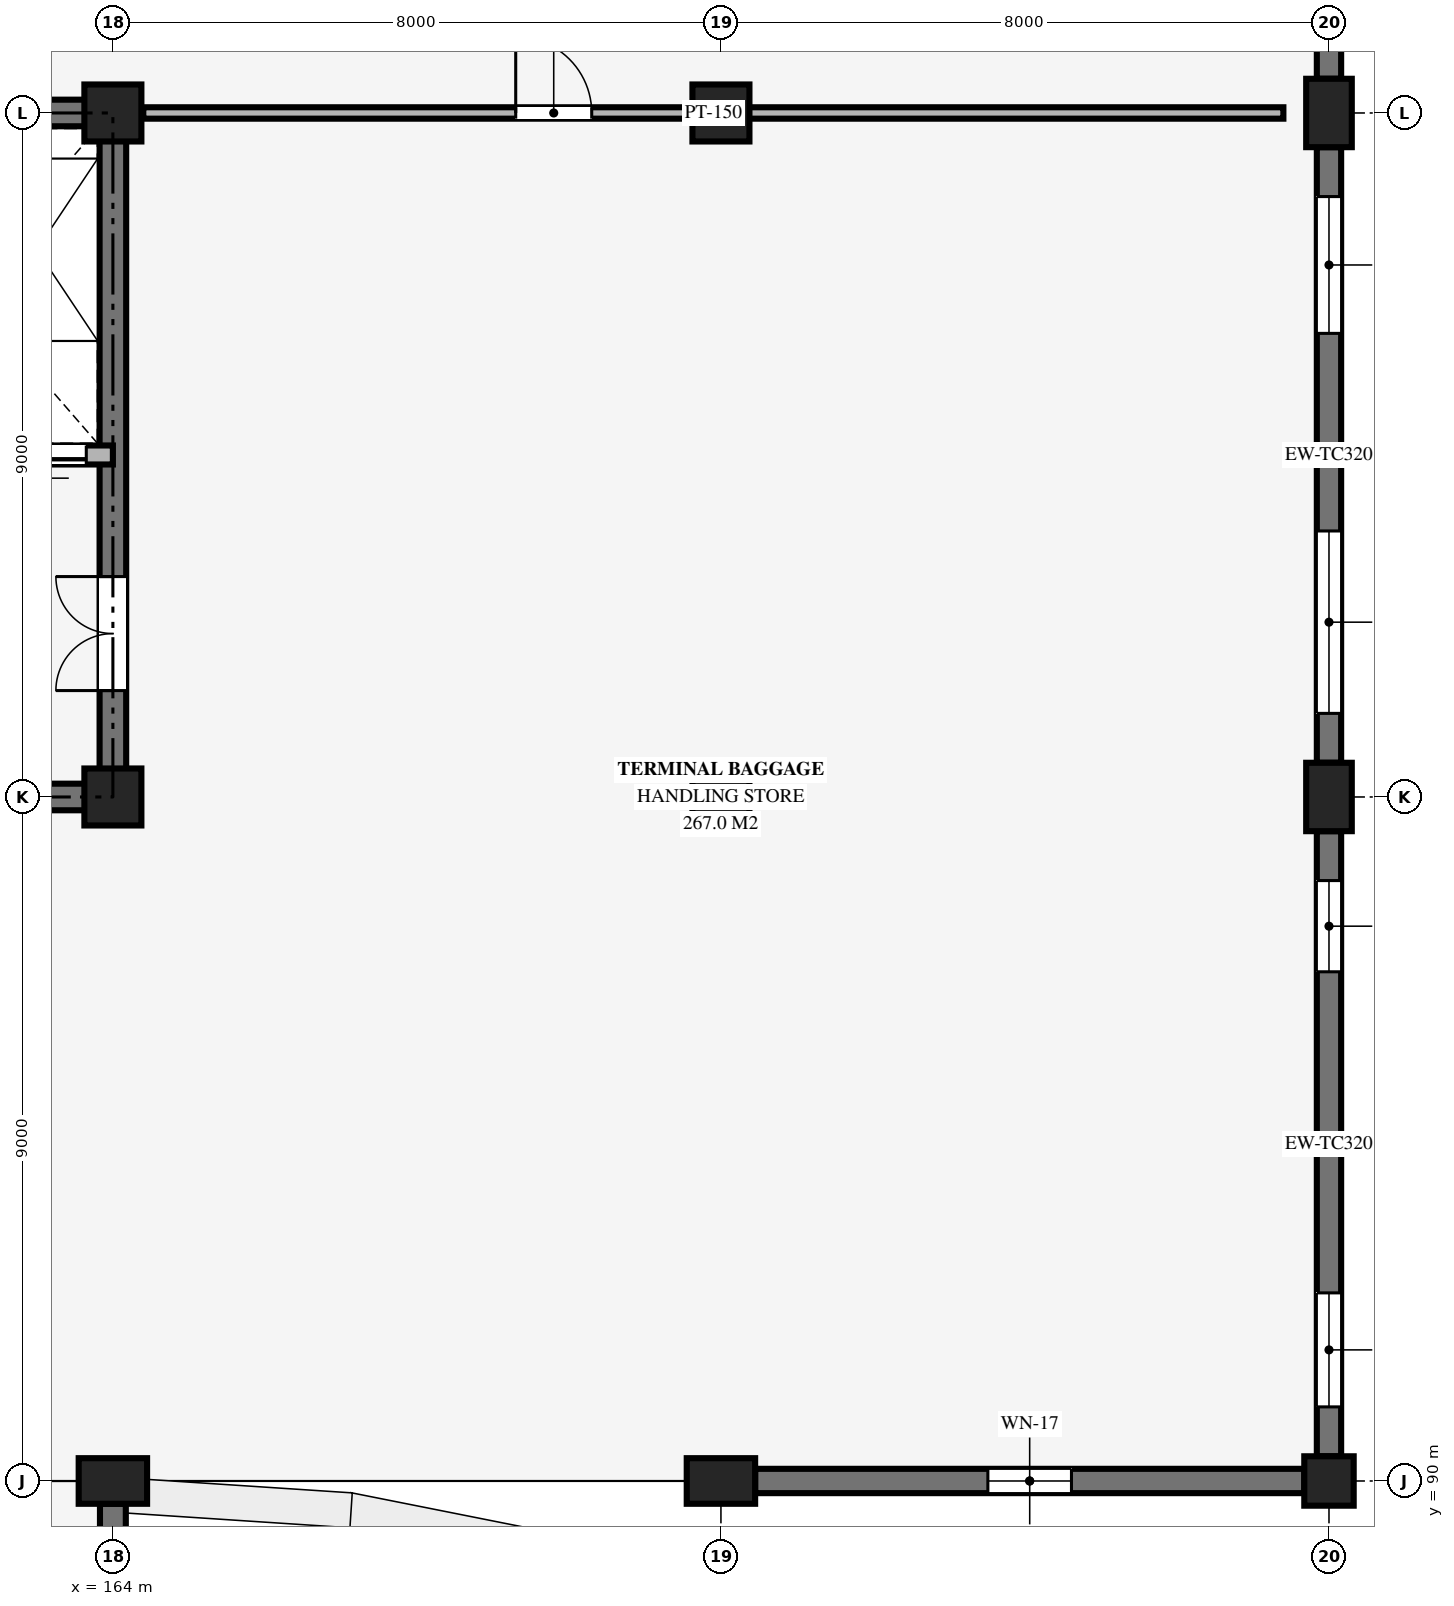
"""IFC4 building model, lengths in metres.
Left out: names, types, materials, properties, quantities, classifications, styles, units other than length and angle.
Written with IfcOpenShell. Run it as: python <this file> out.ifc"""

import sys

from ifc_helpers import new_model, si_unit, direction, frame, frame_2d, origin, origin_2d, place, context, subcontext, project, spatial, rectangle, extrude, element, fill, save


model = new_model("IFC4")
c1 = context("Model", 3, precision=1e-05, world=origin(), true_north=direction((0.0, 1.0)))
c2 = subcontext(c1, "Body", "Model", "MODEL_VIEW")
j1 = project(units=[si_unit("LENGTHUNIT", "METRE"), si_unit("PLANEANGLEUNIT", "RADIAN")], contexts=[c1])
p1 = place(None, origin())
s1 = spatial("IfcSite", under=j1, at=p1, CompositionType="ELEMENT")
p2 = place(p1, origin())
s2 = spatial("IfcBuilding", under=s1, at=p2, CompositionType="ELEMENT")
p3 = place(p2, frame((0.0, 0.0, 5.4)))
s3 = spatial("IfcBuildingStorey", under=s2, at=p3, CompositionType="ELEMENT", Elevation=5.4)
p4 = place(p3, frame((164.0, 90.0, 0.0), z_axis=(0.0, 0.0, 1.0), x_axis=(0.0, 1.0, 0.0)))
e1 = element("IfcColumn", 1, at=p4, inside=s3, PredefinedType="PILASTER", context=c2, shape_type="SweptSolid", body=[
    extrude(rectangle(XDim=0.6, YDim=0.9, at=origin_2d()), origin(), (0.0, 0.0, 1.0), 4.64),
])
for number, where, z_axis, x_axis in (
    (2, (164.0, 99.0, 0.0), (0.0, 0.0, 1.0), (1.0, 0.0, 0.0)),
    (3, (164.0, 108.0, 0.0), (0.0, 0.0, 1.0), (1.0, 0.0, 0.0)),
):
    element("IfcColumn", number, at=place(p3, frame(where, z_axis=z_axis, x_axis=x_axis)), inside=s3, PredefinedType="COLUMN", context=c2, shape_type="SweptSolid", body=[
        extrude(rectangle(XDim=0.75, YDim=0.75, at=origin_2d()), origin(), (0.0, 0.0, 1.0), 4.64),
    ])
p5 = place(p3, frame((172.0, 90.0, 0.0), z_axis=(0.0, 0.0, 1.0), x_axis=(0.0, 1.0, 0.0)))
e4 = element("IfcColumn", 4, at=p5, inside=s3, PredefinedType="PILASTER", context=c2, shape_type="SweptSolid", body=[
    extrude(rectangle(XDim=0.6, YDim=0.9, at=origin_2d()), origin(), (0.0, 0.0, 1.0), 4.64),
])
for number, where, z_axis, x_axis in (
    (5, (172.0, 99.0, 0.0), (0.0, 0.0, 1.0), (1.0, 0.0, 0.0)),
    (6, (172.0, 108.0, 0.0), (0.0, 0.0, 1.0), (1.0, 0.0, 0.0)),
):
    element("IfcColumn", number, at=place(p3, frame(where, z_axis=z_axis, x_axis=x_axis)), inside=s3, PredefinedType="COLUMN", context=c2, shape_type="SweptSolid", body=[
        extrude(rectangle(XDim=0.75, YDim=0.75, at=origin_2d()), origin(), (0.0, 0.0, 1.0), 4.64),
    ])
p6 = place(p3, frame((180.0, 90.0, 0.0), z_axis=(0.0, 0.0, 1.0), x_axis=(1.0, 0.0, 0.0)))
e7 = element("IfcColumn", 7, at=p6, inside=s3, PredefinedType="COLUMN", context=c2, shape_type="SweptSolid", body=[
    extrude(rectangle(XDim=0.65, YDim=0.65, at=origin_2d()), origin(), (0.0, 0.0, 1.0), 4.64),
])
for number, where, z_axis, x_axis in (
    (8, (180.0, 99.0, 0.0), (0.0, 0.0, 1.0), (1.0, 0.0, 0.0)),
    (9, (180.0, 108.0, 0.0), (0.0, 0.0, 1.0), (1.0, 0.0, 0.0)),
):
    element("IfcColumn", number, at=place(p3, frame(where, z_axis=z_axis, x_axis=x_axis)), inside=s3, PredefinedType="PILASTER", context=c2, shape_type="SweptSolid", body=[
        extrude(rectangle(XDim=0.6, YDim=0.9, at=origin_2d()), origin(), (0.0, 0.0, 1.0), 4.64),
    ])
p7 = place(p3, frame((164.0, 88.65, 0.0), z_axis=(0.0, 0.0, 1.0), x_axis=(0.0, 1.0, 0.0)))
e10 = element("IfcWall", 10, at=p7, inside=s3, PredefinedType="SOLIDWALL", context=c2, shape_type="SweptSolid", body=[
    extrude(rectangle(XDim=1.05, YDim=0.34, at=frame_2d((0.525, 0.0))), origin(), (0.0, 0.0, 1.0), 4.52),
])
p8 = place(p3, frame((180.0, 90.325, 0.0), z_axis=(0.0, 0.0, 1.0), x_axis=(0.0, 1.0, 0.0)))
e11 = element("IfcWall", 11, at=p8, inside=s3, PredefinedType="SOLIDWALL", context=c2, shape_type="SweptSolid", body=[
    extrude(rectangle(XDim=8.225, YDim=0.32, at=frame_2d((4.113, 0.0))), origin(), (0.0, 0.0, 1.0), 4.52),
])
p9 = place(p8, frame((0.65, 0.0, 0.95)))
e12 = element("IfcOpeningElement", 12, at=p9, cuts=e11, PredefinedType="OPENING", context=c2, shape_type="SweptSolid", body=[
    extrude(rectangle(XDim=1.5, YDim=1.8, at=frame_2d((0.75, 0.9))), frame((0.0, 0.17, 0.0), z_axis=(0.0, -1.0, 0.0), x_axis=(1.0, 0.0, 0.0)), (0.0, 0.0, 1.0), 0.34),
])
p10 = place(p8, frame((6.375, 0.0, 0.95)))
e13 = element("IfcOpeningElement", 13, at=p10, cuts=e11, PredefinedType="OPENING", context=c2, shape_type="SweptSolid", body=[
    extrude(rectangle(XDim=1.2, YDim=1.8, at=frame_2d((0.6, 0.9))), frame((0.0, 0.17, 0.0), z_axis=(0.0, -1.0, 0.0), x_axis=(1.0, 0.0, 0.0)), (0.0, 0.0, 1.0), 0.34),
])
p11 = place(p3, frame((180.0, 99.45, 0.0), z_axis=(0.0, 0.0, 1.0), x_axis=(0.0, 1.0, 0.0)))
e14 = element("IfcWall", 14, at=p11, inside=s3, PredefinedType="SOLIDWALL", context=c2, shape_type="SweptSolid", body=[
    extrude(rectangle(XDim=8.1, YDim=0.32, at=frame_2d((4.05, 0.0))), origin(), (0.0, 0.0, 1.0), 4.52),
])
p12 = place(p11, frame((0.65, 0.0, 0.95)))
e15 = element("IfcOpeningElement", 15, at=p12, cuts=e14, PredefinedType="OPENING", context=c2, shape_type="SweptSolid", body=[
    extrude(rectangle(XDim=2.4, YDim=1.5, at=frame_2d((1.2, 0.75))), frame((0.0, 0.17, 0.0), z_axis=(0.0, -1.0, 0.0), x_axis=(1.0, 0.0, 0.0)), (0.0, 0.0, 1.0), 0.34),
])
p13 = place(p11, frame((5.65, 0.0, 0.95)))
e16 = element("IfcOpeningElement", 16, at=p13, cuts=e14, PredefinedType="OPENING", context=c2, shape_type="SweptSolid", body=[
    extrude(rectangle(XDim=1.8, YDim=1.5, at=frame_2d((0.9, 0.75))), frame((0.0, 0.17, 0.0), z_axis=(0.0, -1.0, 0.0), x_axis=(1.0, 0.0, 0.0)), (0.0, 0.0, 1.0), 0.34),
])
p14 = place(p3, frame((180.0, 108.45, 0.0), z_axis=(0.0, 0.0, 1.0), x_axis=(0.0, 1.0, 0.0)))
e17 = element("IfcWall", 17, at=p14, inside=s3, PredefinedType="SOLIDWALL", context=c2, shape_type="SweptSolid", body=[
    extrude(rectangle(XDim=8.1, YDim=0.32, at=frame_2d((4.05, 0.0))), origin(), (0.0, 0.0, 1.0), 4.52),
])
p15 = place(p14, frame((0.65, 0.0, 0.95)))
e18 = element("IfcOpeningElement", 18, at=p15, cuts=e17, PredefinedType="OPENING", context=c2, shape_type="SweptSolid", body=[
    extrude(rectangle(XDim=1.5, YDim=1.5, at=frame_2d((0.75, 0.75))), frame((0.0, 0.17, 0.0), z_axis=(0.0, -1.0, 0.0), x_axis=(1.0, 0.0, 0.0)), (0.0, 0.0, 1.0), 0.34),
])
p16 = place(p14, frame((6.25, 0.0, 0.95)))
e19 = element("IfcOpeningElement", 19, at=p16, cuts=e17, PredefinedType="OPENING", context=c2, shape_type="SweptSolid", body=[
    extrude(rectangle(XDim=1.2, YDim=1.5, at=frame_2d((0.6, 0.75))), frame((0.0, 0.17, 0.0), z_axis=(0.0, -1.0, 0.0), x_axis=(1.0, 0.0, 0.0)), (0.0, 0.0, 1.0), 0.34),
])
p17 = place(p3, frame((179.675, 90.0, 0.0), z_axis=(0.0, 0.0, 1.0), x_axis=(-1.0, 0.0, 0.0)))
e20 = element("IfcWall", 20, at=p17, inside=s3, PredefinedType="SOLIDWALL", context=c2, shape_type="SweptSolid", body=[
    extrude(rectangle(XDim=7.225, YDim=0.32, at=frame_2d((3.613, 0.0))), origin(), (0.0, 0.0, 1.0), 4.52),
])
p18 = place(p17, frame((3.063, 0.0, 1.0)))
e21 = element("IfcOpeningElement", 21, at=p18, cuts=e20, PredefinedType="OPENING", context=c2, shape_type="SweptSolid", body=[
    extrude(rectangle(XDim=1.1, YDim=1.1, at=frame_2d((0.55, 0.55))), frame((0.0, 0.17, 0.0), z_axis=(0.0, -1.0, 0.0), x_axis=(1.0, 0.0, 0.0)), (0.0, 0.0, 1.0), 0.34),
])
for number, where, z_axis, x_axis in (
    (22, (156.0, 99.0, 0.0), (0.0, 0.0, 1.0), (1.0, 0.0, 0.0)),
    (23, (156.0, 108.0, 0.0), (0.0, 0.0, 1.0), (1.0, 0.0, 0.0)),
):
    element("IfcWall", number, at=place(p3, frame(where, z_axis=z_axis, x_axis=x_axis)), inside=s3, PredefinedType="SHEAR", context=c2, shape_type="SweptSolid", body=[
        extrude(rectangle(XDim=8.0, YDim=0.35, at=frame_2d((4.0, 0.0))), origin(), (0.0, 0.0, 1.0), 4.78),
    ])
p19 = place(p3, frame((164.0, 99.0, 0.0), z_axis=(0.0, 0.0, 1.0), x_axis=(0.0, 1.0, 0.0)))
e24 = element("IfcWall", 24, at=p19, inside=s3, PredefinedType="SHEAR", context=c2, shape_type="SweptSolid", body=[
    extrude(rectangle(XDim=9.0, YDim=0.35, at=frame_2d((4.5, 0.0))), origin(), (0.0, 0.0, 1.0), 4.78),
])
p20 = place(p19, frame((1.4, 0.0, 0.0)))
e25 = element("IfcOpeningElement", 25, at=p20, cuts=e24, PredefinedType="OPENING", context=c2, shape_type="SweptSolid", body=[
    extrude(rectangle(XDim=1.5, YDim=2.2, at=frame_2d((0.75, 1.1))), frame((0.0, 0.185, 0.0), z_axis=(0.0, -1.0, 0.0), x_axis=(1.0, 0.0, 0.0)), (0.0, 0.0, 1.0), 0.37),
])
p21 = place(p3, frame((164.0, 103.5, 0.0), z_axis=(0.0, 0.0, 1.0), x_axis=(-1.0, 0.0, 0.0)))
e26 = element("IfcWall", 26, at=p21, inside=s3, PredefinedType="SOLIDWALL", context=c2, shape_type="SweptSolid", body=[
    extrude(rectangle(XDim=4.0, YDim=0.25, at=frame_2d((2.0, 0.0))), origin(), (0.0, 0.0, 1.0), 3.65),
])
p22 = place(p21, frame((0.35, 0.0, 0.0)))
e27 = element("IfcOpeningElement", 27, at=p22, cuts=e26, PredefinedType="OPENING", context=c2, shape_type="SweptSolid", body=[
    extrude(rectangle(XDim=1.3, YDim=2.25, at=frame_2d((0.65, 1.125))), frame((0.0, 0.135, 0.0), z_axis=(0.0, -1.0, 0.0), x_axis=(1.0, 0.0, 0.0)), (0.0, 0.0, 1.0), 0.27),
])
p23 = place(p21, frame((2.25, 0.0, 0.0)))
e28 = element("IfcOpeningElement", 28, at=p23, cuts=e26, PredefinedType="OPENING", context=c2, shape_type="SweptSolid", body=[
    extrude(rectangle(XDim=1.2, YDim=2.2, at=frame_2d((0.6, 1.1))), frame((0.0, 0.135, 0.0), z_axis=(0.0, -1.0, 0.0), x_axis=(1.0, 0.0, 0.0)), (0.0, 0.0, 1.0), 0.27),
])
p24 = place(p3, frame((164.4, 108.0, 0.0), z_axis=(0.0, 0.0, 1.0), x_axis=(1.0, 0.0, 0.0)))
e29 = element("IfcWall", 29, at=p24, inside=s3, PredefinedType="PARTITIONING", context=c2, shape_type="SweptSolid", body=[
    extrude(rectangle(XDim=15.0, YDim=0.15, at=frame_2d((7.5, 0.0))), origin(), (0.0, 0.0, 1.0), 3.65),
])
p25 = place(p24, frame((4.9, 0.0, 0.0)))
e30 = element("IfcOpeningElement", 30, at=p25, cuts=e29, PredefinedType="OPENING", context=c2, shape_type="SweptSolid", body=[
    extrude(rectangle(XDim=1.0, YDim=2.15, at=frame_2d((0.5, 1.075))), frame((0.0, 0.085, 0.0), z_axis=(0.0, -1.0, 0.0), x_axis=(1.0, 0.0, 0.0)), (0.0, 0.0, 1.0), 0.17),
])
p26 = place(p9, origin())
e31 = element("IfcWindow", 31, at=p26, inside=s3, PartitioningType="SINGLE_PANEL", PredefinedType="WINDOW", context=c2, shape_type="SweptSolid", body=[
    extrude(rectangle(XDim=1.5, YDim=1.8, at=frame_2d((0.75, 0.9))), frame((0.0, 0.03, 0.0), z_axis=(0.0, -1.0, 0.0), x_axis=(1.0, 0.0, 0.0)), (0.0, 0.0, 1.0), 0.06),
])
fill(e12, e31)
p27 = place(p10, origin())
e32 = element("IfcWindow", 32, at=p27, inside=s3, PartitioningType="SINGLE_PANEL", PredefinedType="WINDOW", context=c2, shape_type="SweptSolid", body=[
    extrude(rectangle(XDim=1.2, YDim=1.8, at=frame_2d((0.6, 0.9))), frame((0.0, 0.03, 0.0), z_axis=(0.0, -1.0, 0.0), x_axis=(1.0, 0.0, 0.0)), (0.0, 0.0, 1.0), 0.06),
])
fill(e13, e32)
p28 = place(p12, origin())
e33 = element("IfcWindow", 33, at=p28, inside=s3, PartitioningType="SINGLE_PANEL", PredefinedType="WINDOW", context=c2, shape_type="SweptSolid", body=[
    extrude(rectangle(XDim=2.4, YDim=1.5, at=frame_2d((1.2, 0.75))), frame((0.0, 0.03, 0.0), z_axis=(0.0, -1.0, 0.0), x_axis=(1.0, 0.0, 0.0)), (0.0, 0.0, 1.0), 0.06),
])
fill(e15, e33)
p29 = place(p13, origin())
e34 = element("IfcWindow", 34, at=p29, inside=s3, PartitioningType="SINGLE_PANEL", PredefinedType="WINDOW", context=c2, shape_type="SweptSolid", body=[
    extrude(rectangle(XDim=1.8, YDim=1.5, at=frame_2d((0.9, 0.75))), frame((0.0, 0.03, 0.0), z_axis=(0.0, -1.0, 0.0), x_axis=(1.0, 0.0, 0.0)), (0.0, 0.0, 1.0), 0.06),
])
fill(e16, e34)
p30 = place(p18, origin())
e35 = element("IfcWindow", 35, at=p30, inside=s3, PartitioningType="SINGLE_PANEL", PredefinedType="WINDOW", context=c2, shape_type="SweptSolid", body=[
    extrude(rectangle(XDim=1.1, YDim=1.1, at=frame_2d((0.55, 0.55))), frame((0.0, 0.03, 0.0), z_axis=(0.0, -1.0, 0.0), x_axis=(1.0, 0.0, 0.0)), (0.0, 0.0, 1.0), 0.06),
])
fill(e21, e35)
p31 = place(p22, origin())
e36 = element("IfcDoor", 36, at=p31, inside=s3, OperationType="DOUBLE_DOOR_SLIDING", PredefinedType="USERDEFINED", context=c2, shape_type="SweptSolid", body=[
    extrude(rectangle(XDim=1.3, YDim=2.25, at=frame_2d((0.65, 1.125))), frame((0.0, 0.025, 0.0), z_axis=(0.0, -1.0, 0.0), x_axis=(1.0, 0.0, 0.0)), (0.0, 0.0, 1.0), 0.05),
])
fill(e27, e36)
p32 = place(p20, origin())
e37 = element("IfcDoor", 37, at=p32, inside=s3, OperationType="DOUBLE_DOOR_SINGLE_SWING", PredefinedType="DOOR", context=c2, shape_type="SweptSolid", body=[
    extrude(rectangle(XDim=1.5, YDim=2.2, at=frame_2d((0.75, 1.1))), frame((0.0, 0.025, 0.0), z_axis=(0.0, -1.0, 0.0), x_axis=(1.0, 0.0, 0.0)), (0.0, 0.0, 1.0), 0.05),
])
fill(e25, e37)
p33 = place(p25, origin())
e38 = element("IfcDoor", 38, at=p33, inside=s3, OperationType="SINGLE_SWING_LEFT", PredefinedType="DOOR", context=c2, shape_type="SweptSolid", body=[
    extrude(rectangle(XDim=1.0, YDim=2.15, at=frame_2d((0.5, 1.075))), frame((0.0, 0.025, 0.0), z_axis=(0.0, -1.0, 0.0), x_axis=(1.0, 0.0, 0.0)), (0.0, 0.0, 1.0), 0.05),
])
fill(e30, e38)
save(model, sys.argv[1])
